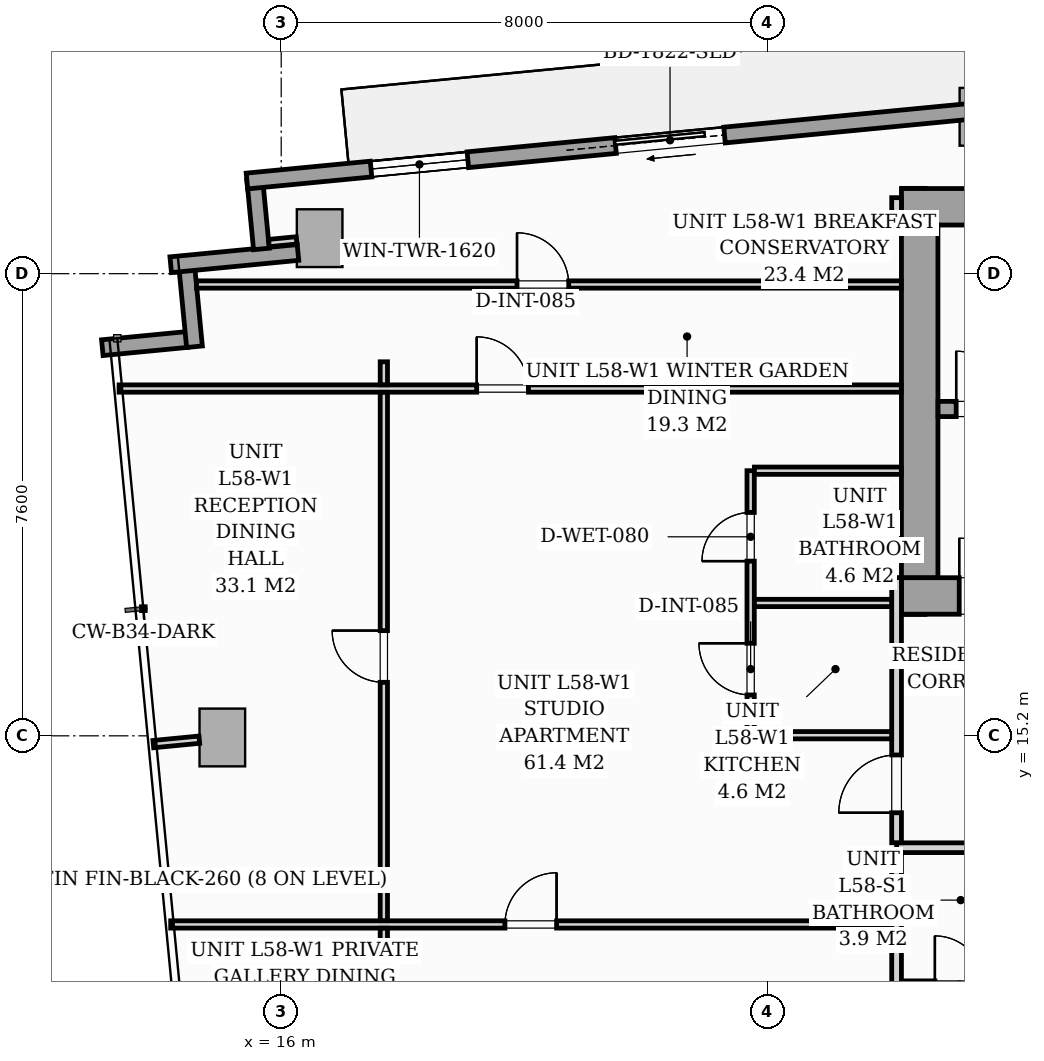
"""IFC4 building model, lengths in metres.
Left out: names, types, materials, properties, quantities, classifications, styles, units other than length and angle.
Written with IfcOpenShell. Run it as: python <this file> out.ifc"""

import sys

from ifc_helpers import new_model, si_unit, direction, frame, frame_2d, origin, origin_2d, place, context, subcontext, project, spatial, rectangle, i_section, extrude, source, transform, mapped, element, fill, save


model = new_model("IFC4")
c1 = context("Model", 3, precision=1e-05, world=origin(), true_north=direction((0.0, 1.0)))
c2 = subcontext(c1, "Body", "Model", "MODEL_VIEW")
j1 = project(units=[si_unit("LENGTHUNIT", "METRE"), si_unit("PLANEANGLEUNIT", "RADIAN")], contexts=[c1])
p1 = place(None, origin())
s1 = spatial("IfcSite", under=j1, at=p1, CompositionType="ELEMENT")
p2 = place(p1, origin())
s2 = spatial("IfcBuilding", under=s1, at=p2, CompositionType="ELEMENT")
p3 = place(p2, frame((0.0, 0.0, 201.8)))
s3 = spatial("IfcBuildingStorey", under=s2, at=p3, CompositionType="ELEMENT", Elevation=201.8)
m1 = source(origin(), c2, "Body", "SweptSolid", [
    extrude(i_section(OverallWidth=0.416, OverallDepth=0.446, WebThickness=0.039, FlangeThickness=0.063, FilletRadius=0.018, at=origin_2d()), origin(), (0.0, 0.0, 1.0), 3.196),
])
for number, where, z_axis, x_axis in (
    (1, (26.4, 17.4, 0.002), (0.0, 0.0, 1.0), (1.0, 0.0, 0.0)),
    (2, (26.4, 24.0, 0.002), (0.0, 0.0, 1.0), (1.0, 0.0, 0.0)),
):
    element("IfcColumn", number, at=place(p3, frame(where, z_axis=z_axis, x_axis=x_axis)), inside=s3, PredefinedType="PILASTER", context=c2, shape_type="MappedRepresentation", body=[
        mapped(m1, transform((0.0, 0.0, 0.0), scale=1.0)),
    ])
m2 = source(origin(), c2, "Body", "SweptSolid", [
    extrude(rectangle(XDim=0.75, YDim=0.95, at=origin_2d()), origin(), (0.0, 0.0, 1.0), 3.196),
])
for number, where, z_axis, x_axis in (
    (3, (16.632, 23.384, 0.002), (0.0, 0.0, 1.0), (0.995, 0.096, 0.0)),
    (4, (27.532, 25.38, 0.002), (0.0, 0.0, 1.0), (0.995, 0.096, 0.0)),
    (5, (15.032, 15.173, 0.002), (0.0, 0.0, 1.0), (0.995, 0.096, 0.0)),
):
    element("IfcColumn", number, at=place(p3, frame(where, z_axis=z_axis, x_axis=x_axis)), inside=s3, PredefinedType="COLUMN", context=c2, shape_type="MappedRepresentation", body=[
        mapped(m2, transform((0.0, 0.0, 0.0), scale=1.0)),
    ])
p4 = place(p3, frame((13.058, 21.583, 0.0), z_axis=(0.0, 0.0, 1.0), x_axis=(0.99540774648, 0.095725744959, 0.0)))
e6 = element("IfcWall", 6, at=p4, inside=s3, PredefinedType="STANDARD", context=c2, shape_type="SweptSolid", body=[
    extrude(rectangle(XDim=1.395, YDim=0.26, at=frame_2d((0.698, 0.0))), origin(), (0.0, 0.0, 1.0), 2.94),
])
p5 = place(p3, frame((14.574, 21.599, 0.0), z_axis=(0.0, 0.0, 1.0), x_axis=(-0.095742423056, 0.99540614245, 0.0)))
e7 = element("IfcWall", 7, at=p5, inside=s3, PredefinedType="STANDARD", context=c2, shape_type="SweptSolid", body=[
    extrude(rectangle(XDim=1.395, YDim=0.26, at=frame_2d((0.697, 0.0))), origin(), (0.0, 0.0, 1.0), 2.94),
])
p6 = place(p3, frame((14.183, 22.947, 0.0), z_axis=(0.0, 0.0, 1.0), x_axis=(0.995401580483, 0.095789840651, 0.0)))
e8 = element("IfcWall", 8, at=p6, inside=s3, PredefinedType="STANDARD", context=c2, shape_type="SweptSolid", body=[
    extrude(rectangle(XDim=2.103, YDim=0.26, at=frame_2d((1.051, 0.0))), origin(), (0.0, 0.0, 1.0), 2.94),
])
p7 = place(p3, frame((15.675, 23.207, 0.0), z_axis=(0.0, 0.0, 1.0), x_axis=(-0.095951054827, 0.995386053287, 0.0)))
e9 = element("IfcWall", 9, at=p7, inside=s3, PredefinedType="STANDARD", context=c2, shape_type="SweptSolid", body=[
    extrude(rectangle(XDim=1.15, YDim=0.26, at=frame_2d((0.575, 0.0))), origin(), (0.0, 0.0, 1.0), 2.94),
])
p8 = place(p3, frame((15.437, 24.324, 0.0), z_axis=(0.0, 0.0, 1.0), x_axis=(0.995395627913, 0.095851676732, 0.0)))
e10 = element("IfcWall", 10, at=p8, inside=s3, PredefinedType="STANDARD", context=c2, shape_type="SweptSolid", body=[
    extrude(rectangle(XDim=16.1, YDim=0.26, at=frame_2d((8.05, 0.0))), origin(), (0.0, 0.0, 1.0), 2.94),
])
p9 = place(p8, frame((6.09, 0.0, 0.0)))
e11 = element("IfcOpeningElement", 11, at=p9, cuts=e10, PredefinedType="OPENING", context=c2, shape_type="SweptSolid", body=[
    extrude(rectangle(XDim=1.8, YDim=2.06, at=frame_2d((0.9, 1.03))), frame((0.0, 0.14, 0.0), z_axis=(0.0, -1.0, 0.0), x_axis=(1.0, 0.0, 0.0)), (0.0, 0.0, 1.0), 0.28),
])
p10 = place(p8, frame((2.05, 0.0, 0.65)))
e12 = element("IfcOpeningElement", 12, at=p10, cuts=e10, PredefinedType="OPENING", context=c2, shape_type="SweptSolid", body=[
    extrude(rectangle(XDim=1.6, YDim=1.5, at=frame_2d((0.8, 0.75))), frame((0.0, 0.14, 0.0), z_axis=(0.0, -1.0, 0.0), x_axis=(1.0, 0.0, 0.0)), (0.0, 0.0, 1.0), 0.28),
])
p11 = place(p3, frame((26.2, 17.5, 0.0), z_axis=(0.0, 0.0, 1.0), x_axis=(1.0, 0.0, 0.0)))
e13 = element("IfcWall", 13, at=p11, inside=s3, PredefinedType="SHEAR", context=c2, shape_type="SweptSolid", body=[
    extrude(rectangle(XDim=19.6, YDim=0.6, at=frame_2d((9.8, 0.0))), origin(), (0.0, 0.0, 1.0), 3.2),
])
p12 = place(p11, frame((0.95, 0.0, 0.0)))
e14 = element("IfcOpeningElement", 14, at=p12, cuts=e13, PredefinedType="OPENING", context=c2, shape_type="SweptSolid", body=[
    extrude(rectangle(XDim=0.95, YDim=2.06, at=frame_2d((0.475, 1.03))), frame((0.0, 0.31, 0.0), z_axis=(0.0, -1.0, 0.0), x_axis=(1.0, 0.0, 0.0)), (0.0, 0.0, 1.0), 0.62),
])
p13 = place(p11, frame((9.38, 0.0, 0.0)))
e15 = element("IfcOpeningElement", 15, at=p13, cuts=e13, PredefinedType="OPENING", context=c2, shape_type="SweptSolid", body=[
    extrude(rectangle(XDim=0.85, YDim=2.0, at=frame_2d((0.425, 1.0))), frame((0.0, 0.31, 0.0), z_axis=(0.0, -1.0, 0.0), x_axis=(1.0, 0.0, 0.0)), (0.0, 0.0, 1.0), 0.62),
])
p14 = place(p11, frame((17.55, 0.0, 0.0)))
e16 = element("IfcOpeningElement", 16, at=p14, cuts=e13, PredefinedType="OPENING", context=c2, shape_type="SweptSolid", body=[
    extrude(rectangle(XDim=0.95, YDim=2.06, at=frame_2d((0.475, 1.03))), frame((0.0, 0.31, 0.0), z_axis=(0.0, -1.0, 0.0), x_axis=(1.0, 0.0, 0.0)), (0.0, 0.0, 1.0), 0.62),
])
p15 = place(p3, frame((26.2, 23.9, 0.0), z_axis=(0.0, 0.0, 1.0), x_axis=(1.0, 0.0, 0.0)))
e17 = element("IfcWall", 17, at=p15, inside=s3, PredefinedType="SHEAR", context=c2, shape_type="SweptSolid", body=[
    extrude(rectangle(XDim=19.6, YDim=0.6, at=frame_2d((9.8, 0.0))), origin(), (0.0, 0.0, 1.0), 3.2),
])
p16 = place(p3, frame((26.5, 17.802, 0.0), z_axis=(0.0, 0.0, 1.0), x_axis=(0.0, 1.0, 0.0)))
e18 = element("IfcWall", 18, at=p16, inside=s3, PredefinedType="SHEAR", context=c2, shape_type="SweptSolid", body=[
    extrude(rectangle(XDim=5.796, YDim=0.6, at=frame_2d((2.898, 0.0))), origin(), (0.0, 0.0, 1.0), 3.2),
])
p17 = place(p3, frame((26.802, 20.575, 0.0), z_axis=(0.0, 0.0, 1.0), x_axis=(1.0, 0.0, 0.0)))
e19 = element("IfcWall", 19, at=p17, inside=s3, PredefinedType="SOLIDWALL", context=c2, shape_type="SweptSolid", body=[
    extrude(rectangle(XDim=8.148, YDim=0.25, at=frame_2d((4.074, 0.0))), origin(), (0.0, 0.0, 1.0), 3.2),
])
p18 = place(p17, frame((0.298, 0.0, 0.0)))
e20 = element("IfcOpeningElement", 20, at=p18, cuts=e19, PredefinedType="OPENING", context=c2, shape_type="SweptSolid", body=[
    extrude(rectangle(XDim=0.95, YDim=2.06, at=frame_2d((0.475, 1.03))), frame((0.0, 0.135, 0.0), z_axis=(0.0, -1.0, 0.0), x_axis=(1.0, 0.0, 0.0)), (0.0, 0.0, 1.0), 0.27),
])
p19 = place(p3, frame((26.12, 13.36, 0.0), z_axis=(0.0, 0.0, 1.0), x_axis=(1.0, 0.0, 0.0)))
e21 = element("IfcWall", 21, at=p19, inside=s3, PredefinedType="PARTITIONING", context=c2, shape_type="SweptSolid", body=[
    extrude(rectangle(XDim=19.76, YDim=0.16, at=frame_2d((9.88, 0.0))), origin(), (0.0, 0.0, 1.0), 2.94),
])
p20 = place(p19, frame((5.221, 0.0, 0.0)))
e22 = element("IfcOpeningElement", 22, at=p20, cuts=e21, PredefinedType="OPENING", context=c2, shape_type="SweptSolid", body=[
    extrude(rectangle(XDim=0.95, YDim=2.06, at=frame_2d((0.475, 1.03))), frame((0.0, 0.09, 0.0), z_axis=(0.0, -1.0, 0.0), x_axis=(1.0, 0.0, 0.0)), (0.0, 0.0, 1.0), 0.18),
])
p21 = place(p19, frame((12.119, 0.0, 0.0)))
e23 = element("IfcOpeningElement", 23, at=p21, cuts=e21, PredefinedType="OPENING", context=c2, shape_type="SweptSolid", body=[
    extrude(rectangle(XDim=0.95, YDim=2.06, at=frame_2d((0.475, 1.03))), frame((0.0, 0.09, 0.0), z_axis=(0.0, -1.0, 0.0), x_axis=(1.0, 0.0, 0.0)), (0.0, 0.0, 1.0), 0.18),
])
p22 = place(p19, frame((14.492, 0.0, 0.0)))
e24 = element("IfcOpeningElement", 24, at=p22, cuts=e21, PredefinedType="OPENING", context=c2, shape_type="SweptSolid", body=[
    extrude(rectangle(XDim=0.95, YDim=2.06, at=frame_2d((0.475, 1.03))), frame((0.0, 0.09, 0.0), z_axis=(0.0, -1.0, 0.0), x_axis=(1.0, 0.0, 0.0)), (0.0, 0.0, 1.0), 0.18),
])
p23 = place(p3, frame((26.12, 7.261, 0.0), z_axis=(0.0, 0.0, 1.0), x_axis=(0.0, 1.0, 0.0)))
e25 = element("IfcWall", 25, at=p23, inside=s3, PredefinedType="PARTITIONING", context=c2, shape_type="SweptSolid", body=[
    extrude(rectangle(XDim=6.017, YDim=0.16, at=frame_2d((3.008, 0.0))), origin(), (0.0, 0.0, 1.0), 2.94),
])
p24 = place(p3, frame((26.12, 13.442, 0.0), z_axis=(0.0, 0.0, 1.0), x_axis=(0.0, 1.0, 0.0)))
e26 = element("IfcWall", 26, at=p24, inside=s3, PredefinedType="PARTITIONING", context=c2, shape_type="SweptSolid", body=[
    extrude(rectangle(XDim=4.36, YDim=0.16, at=frame_2d((2.18, 0.0))), origin(), (0.0, 0.0, 1.0), 2.94),
])
p25 = place(p24, frame((0.493, 0.0, 0.0)))
e27 = element("IfcOpeningElement", 27, at=p25, cuts=e26, PredefinedType="OPENING", context=c2, shape_type="SweptSolid", body=[
    extrude(rectangle(XDim=0.95, YDim=2.06, at=frame_2d((0.475, 1.03))), frame((0.0, 0.09, 0.0), z_axis=(0.0, -1.0, 0.0), x_axis=(1.0, 0.0, 0.0)), (0.0, 0.0, 1.0), 0.18),
])
p26 = place(p3, frame((26.12, 23.598, 0.0), z_axis=(0.0, 0.0, 1.0), x_axis=(0.0, 1.0, 0.0)))
e28 = element("IfcWall", 28, at=p26, inside=s3, PredefinedType="PARTITIONING", context=c2, shape_type="SweptSolid", body=[
    extrude(rectangle(XDim=0.452, YDim=0.16, at=frame_2d((0.226, 0.0))), origin(), (0.0, 0.0, 1.0), 2.94),
])
p27 = place(p3, frame((26.202, 11.11, 0.0), z_axis=(0.0, 0.0, 1.0), x_axis=(1.0, 0.0, 0.0)))
e29 = element("IfcWall", 29, at=p27, inside=s3, PredefinedType="PARTITIONING", context=c2, shape_type="SweptSolid", body=[
    extrude(rectangle(XDim=4.098, YDim=0.12, at=frame_2d((2.049, 0.0))), origin(), (0.0, 0.0, 1.0), 2.94),
])
p28 = place(p27, frame((0.548, 0.0, 0.0)))
e30 = element("IfcOpeningElement", 30, at=p28, cuts=e29, PredefinedType="OPENING", context=c2, shape_type="SweptSolid", body=[
    extrude(rectangle(XDim=0.8, YDim=2.02, at=frame_2d((0.4, 1.01))), frame((0.0, 0.07, 0.0), z_axis=(0.0, -1.0, 0.0), x_axis=(1.0, 0.0, 0.0)), (0.0, 0.0, 1.0), 0.14),
])
p29 = place(p27, frame((2.573, 0.0, 0.0)))
e31 = element("IfcOpeningElement", 31, at=p29, cuts=e29, PredefinedType="OPENING", context=c2, shape_type="SweptSolid", body=[
    extrude(rectangle(XDim=0.85, YDim=2.05, at=frame_2d((0.425, 1.025))), frame((0.0, 0.07, 0.0), z_axis=(0.0, -1.0, 0.0), x_axis=(1.0, 0.0, 0.0)), (0.0, 0.0, 1.0), 0.14),
])
p30 = place(p3, frame((23.72, 15.21, 0.0), z_axis=(0.0, 0.0, 1.0), x_axis=(0.0, 1.0, 0.0)))
e32 = element("IfcWall", 32, at=p30, inside=s3, PredefinedType="PARTITIONING", context=c2, shape_type="SweptSolid", body=[
    extrude(rectangle(XDim=4.35, YDim=0.12, at=frame_2d((2.175, 0.0))), origin(), (0.0, 0.0, 1.0), 2.94),
])
p31 = place(p30, frame((0.662, 0.0, 0.0)))
e33 = element("IfcOpeningElement", 33, at=p31, cuts=e32, PredefinedType="OPENING", context=c2, shape_type="SweptSolid", body=[
    extrude(rectangle(XDim=0.85, YDim=2.05, at=frame_2d((0.425, 1.025))), frame((0.0, 0.07, 0.0), z_axis=(0.0, -1.0, 0.0), x_axis=(1.0, 0.0, 0.0)), (0.0, 0.0, 1.0), 0.14),
])
p32 = place(p30, frame((2.863, 0.0, 0.0)))
e34 = element("IfcOpeningElement", 34, at=p32, cuts=e32, PredefinedType="OPENING", context=c2, shape_type="SweptSolid", body=[
    extrude(rectangle(XDim=0.8, YDim=2.02, at=frame_2d((0.4, 1.01))), frame((0.0, 0.07, 0.0), z_axis=(0.0, -1.0, 0.0), x_axis=(1.0, 0.0, 0.0)), (0.0, 0.0, 1.0), 0.14),
])
p33 = place(p3, frame((23.782, 17.385, 0.0), z_axis=(0.0, 0.0, 1.0), x_axis=(1.0, 0.0, 0.0)))
e35 = element("IfcWall", 35, at=p33, inside=s3, PredefinedType="PARTITIONING", context=c2, shape_type="SweptSolid", body=[
    extrude(rectangle(XDim=2.256, YDim=0.12, at=frame_2d((1.128, 0.0))), origin(), (0.0, 0.0, 1.0), 2.281),
])
p34 = place(p3, frame((23.782, 15.21, 0.0), z_axis=(0.0, 0.0, 1.0), x_axis=(1.0, 0.0, 0.0)))
e36 = element("IfcWall", 36, at=p34, inside=s3, PredefinedType="PARTITIONING", context=c2, shape_type="SweptSolid", body=[
    extrude(rectangle(XDim=2.256, YDim=0.12, at=frame_2d((1.128, 0.0))), origin(), (0.0, 0.0, 1.0), 2.94),
])
p35 = place(p3, frame((23.782, 19.56, 0.0), z_axis=(0.0, 0.0, 1.0), x_axis=(1.0, 0.0, 0.0)))
e37 = element("IfcWall", 37, at=p35, inside=s3, PredefinedType="PARTITIONING", context=c2, shape_type="SweptSolid", body=[
    extrude(rectangle(XDim=2.416, YDim=0.12, at=frame_2d((1.208, 0.0))), origin(), (0.0, 0.0, 1.0), 2.94),
])
p36 = place(p3, frame((14.608, 22.622, 0.0), z_axis=(0.0, 0.0, 1.0), x_axis=(1.0, 0.0, 0.0)))
e38 = element("IfcWall", 38, at=p36, inside=s3, PredefinedType="PARTITIONING", context=c2, shape_type="SweptSolid", body=[
    extrude(rectangle(XDim=11.59, YDim=0.12, at=frame_2d((5.795, 0.0))), origin(), (0.0, 0.0, 1.0), 2.94),
])
p37 = place(p36, frame((5.27, 0.0, 0.0)))
e39 = element("IfcOpeningElement", 39, at=p37, cuts=e38, PredefinedType="OPENING", context=c2, shape_type="SweptSolid", body=[
    extrude(rectangle(XDim=0.85, YDim=2.05, at=frame_2d((0.425, 1.025))), frame((0.0, 0.07, 0.0), z_axis=(0.0, -1.0, 0.0), x_axis=(1.0, 0.0, 0.0)), (0.0, 0.0, 1.0), 0.14),
])
p38 = place(p3, frame((14.183, 12.098, 0.0), z_axis=(0.0, 0.0, 1.0), x_axis=(1.0, 0.0, 0.0)))
e40 = element("IfcWall", 40, at=p38, inside=s3, PredefinedType="PARTITIONING", context=c2, shape_type="SweptSolid", body=[
    extrude(rectangle(XDim=11.855, YDim=0.12, at=frame_2d((5.928, 0.0))), origin(), (0.0, 0.0, 1.0), 2.94),
])
p39 = place(p38, frame((5.496, 0.0, 0.0)))
e41 = element("IfcOpeningElement", 41, at=p39, cuts=e40, PredefinedType="OPENING", context=c2, shape_type="SweptSolid", body=[
    extrude(rectangle(XDim=0.85, YDim=2.05, at=frame_2d((0.425, 1.025))), frame((0.0, 0.07, 0.0), z_axis=(0.0, -1.0, 0.0), x_axis=(1.0, 0.0, 0.0)), (0.0, 0.0, 1.0), 0.14),
])
p40 = place(p3, frame((13.334, 20.911, 0.0), z_axis=(0.0, 0.0, 1.0), x_axis=(1.0, 0.0, 0.0)))
e42 = element("IfcWall", 42, at=p40, inside=s3, PredefinedType="PARTITIONING", context=c2, shape_type="SweptSolid", body=[
    extrude(rectangle(XDim=12.864, YDim=0.12, at=frame_2d((6.432, 0.0))), origin(), (0.0, 0.0, 1.0), 2.94),
])
p41 = place(p40, frame((5.881, 0.0, 0.0)))
e43 = element("IfcOpeningElement", 43, at=p41, cuts=e42, PredefinedType="OPENING", context=c2, shape_type="SweptSolid", body=[
    extrude(rectangle(XDim=0.85, YDim=2.05, at=frame_2d((0.425, 1.025))), frame((0.0, 0.07, 0.0), z_axis=(0.0, -1.0, 0.0), x_axis=(1.0, 0.0, 0.0)), (0.0, 0.0, 1.0), 0.14),
])
p42 = place(p3, frame((17.688, 11.658, 0.0), z_axis=(0.0, 0.0, 1.0), x_axis=(0.0, 1.0, 0.0)))
e44 = element("IfcWall", 44, at=p42, inside=s3, PredefinedType="PARTITIONING", context=c2, shape_type="SweptSolid", body=[
    extrude(rectangle(XDim=0.378, YDim=0.12, at=frame_2d((0.189, 0.0))), origin(), (0.0, 0.0, 1.0), 2.94),
])
p43 = place(p3, frame((17.688, 12.16, 0.0), z_axis=(0.0, 0.0, 1.0), x_axis=(0.0, 1.0, 0.0)))
e45 = element("IfcWall", 45, at=p43, inside=s3, PredefinedType="PARTITIONING", context=c2, shape_type="SweptSolid", body=[
    extrude(rectangle(XDim=8.689, YDim=0.12, at=frame_2d((4.345, 0.0))), origin(), (0.0, 0.0, 1.0), 2.94),
])
p44 = place(p43, frame((3.92, 0.0, 0.0)))
e46 = element("IfcOpeningElement", 46, at=p44, cuts=e45, PredefinedType="OPENING", context=c2, shape_type="SweptSolid", body=[
    extrude(rectangle(XDim=0.85, YDim=2.05, at=frame_2d((0.425, 1.025))), frame((0.0, 0.07, 0.0), z_axis=(0.0, -1.0, 0.0), x_axis=(1.0, 0.0, 0.0)), (0.0, 0.0, 1.0), 0.14),
])
p45 = place(p3, frame((17.688, 20.973, 0.0), z_axis=(0.0, 0.0, 1.0), x_axis=(0.0, 1.0, 0.0)))
e47 = element("IfcWall", 47, at=p45, inside=s3, PredefinedType="PARTITIONING", context=c2, shape_type="SweptSolid", body=[
    extrude(rectangle(XDim=0.378, YDim=0.12, at=frame_2d((0.189, 0.0))), origin(), (0.0, 0.0, 1.0), 2.94),
])
p46 = place(p3, frame((16.254, 23.348, 0.0), z_axis=(0.0, 0.0, 1.0), x_axis=(-0.995389482415, -0.095915474751, 0.0)))
e48 = element("IfcWall", 48, at=p46, inside=s3, PredefinedType="PARTITIONING", context=c2, shape_type="SweptSolid", body=[
    extrude(rectangle(XDim=0.458, YDim=0.12, at=frame_2d((0.229, 0.0))), origin(), (0.0, 0.0, 1.0), 2.94),
])
p47 = place(p3, frame((14.654, 15.136, 0.0), z_axis=(0.0, 0.0, 1.0), x_axis=(-0.995408440582, -0.095718527039, 0.0)))
e49 = element("IfcWall", 49, at=p47, inside=s3, PredefinedType="PARTITIONING", context=c2, shape_type="SweptSolid", body=[
    extrude(rectangle(XDim=0.76, YDim=0.12, at=frame_2d((0.38, 0.0))), origin(), (0.0, 0.0, 1.0), 2.94),
])
m3 = source(origin(), c2, "Body", "SweptSolid", [
    extrude(rectangle(XDim=1.8, YDim=2.06, at=frame_2d((0.9, 1.03))), frame((0.0, 0.025, 0.0), z_axis=(0.0, -1.0, 0.0), x_axis=(1.0, 0.0, 0.0)), (0.0, 0.0, 1.0), 0.05),
])
p48 = place(p9, origin())
e50 = element("IfcDoor", 50, at=p48, inside=s3, OperationType="SLIDING_TO_LEFT", PredefinedType="DOOR", context=c2, shape_type="MappedRepresentation", body=[
    mapped(m3, transform((0.0, 0.0, 0.0), scale=1.0)),
])
fill(e11, e50)
m4 = source(origin(), c2, "Body", "SweptSolid", [
    extrude(rectangle(XDim=1.6, YDim=1.5, at=frame_2d((0.8, 0.75))), frame((0.0, 0.03, 0.0), z_axis=(0.0, -1.0, 0.0), x_axis=(1.0, 0.0, 0.0)), (0.0, 0.0, 1.0), 0.06),
])
p49 = place(p10, origin())
e51 = element("IfcWindow", 51, at=p49, inside=s3, PartitioningType="SINGLE_PANEL", PredefinedType="WINDOW", context=c2, shape_type="MappedRepresentation", body=[
    mapped(m4, transform((0.0, 0.0, 0.0), scale=1.0)),
])
fill(e12, e51)
m5 = source(origin(), c2, "Body", "SweptSolid", [
    extrude(rectangle(XDim=0.95, YDim=2.06, at=frame_2d((0.475, 1.03))), frame((0.0, 0.025, 0.0), z_axis=(0.0, -1.0, 0.0), x_axis=(1.0, 0.0, 0.0)), (0.0, 0.0, 1.0), 0.05),
])
p50 = place(p12, origin())
e52 = element("IfcDoor", 52, at=p50, inside=s3, OperationType="SINGLE_SWING_LEFT", PredefinedType="DOOR", context=c2, shape_type="MappedRepresentation", body=[
    mapped(m5, transform((0.0, 0.0, 0.0), scale=1.0)),
])
fill(e14, e52)
p51 = place(p18, origin())
e53 = element("IfcDoor", 53, at=p51, inside=s3, OperationType="SINGLE_SWING_LEFT", PredefinedType="DOOR", context=c2, shape_type="MappedRepresentation", body=[
    mapped(m5, transform((0.0, 0.0, 0.0), scale=1.0)),
])
fill(e20, e53)
m6 = source(origin(), c2, "Body", "SweptSolid", [
    extrude(rectangle(XDim=0.95, YDim=2.06, at=frame_2d((0.475, 1.03))), frame((0.0, 0.025, 0.0), z_axis=(0.0, -1.0, 0.0), x_axis=(1.0, 0.0, 0.0)), (0.0, 0.0, 1.0), 0.05),
])
p52 = place(p25, origin())
e54 = element("IfcDoor", 54, at=p52, inside=s3, OperationType="SINGLE_SWING_LEFT", PredefinedType="DOOR", context=c2, shape_type="MappedRepresentation", body=[
    mapped(m6, transform((0.0, 0.0, 0.0), scale=1.0)),
])
fill(e27, e54)
m7 = source(origin(), c2, "Body", "SweptSolid", [
    extrude(rectangle(XDim=0.85, YDim=2.05, at=frame_2d((0.425, 1.025))), frame((0.0, 0.025, 0.0), z_axis=(0.0, -1.0, 0.0), x_axis=(1.0, 0.0, 0.0)), (0.0, 0.0, 1.0), 0.05),
])
p53 = place(p31, origin())
e55 = element("IfcDoor", 55, at=p53, inside=s3, OperationType="SINGLE_SWING_RIGHT", PredefinedType="DOOR", context=c2, shape_type="MappedRepresentation", body=[
    mapped(m7, transform((0.0, 0.0, 0.0), scale=1.0)),
])
fill(e33, e55)
m8 = source(origin(), c2, "Body", "SweptSolid", [
    extrude(rectangle(XDim=0.8, YDim=2.02, at=frame_2d((0.4, 1.01))), frame((0.0, 0.025, 0.0), z_axis=(0.0, -1.0, 0.0), x_axis=(1.0, 0.0, 0.0)), (0.0, 0.0, 1.0), 0.05),
])
p54 = place(p32, origin())
e56 = element("IfcDoor", 56, at=p54, inside=s3, OperationType="SINGLE_SWING_LEFT", PredefinedType="DOOR", context=c2, shape_type="MappedRepresentation", body=[
    mapped(m8, transform((0.0, 0.0, 0.0), scale=1.0)),
])
fill(e34, e56)
p55 = place(p37, origin())
e57 = element("IfcDoor", 57, at=p55, inside=s3, OperationType="SINGLE_SWING_LEFT", PredefinedType="DOOR", context=c2, shape_type="MappedRepresentation", body=[
    mapped(m7, transform((0.0, 0.0, 0.0), scale=1.0)),
])
fill(e39, e57)
p56 = place(p39, origin())
e58 = element("IfcDoor", 58, at=p56, inside=s3, OperationType="SINGLE_SWING_RIGHT", PredefinedType="DOOR", context=c2, shape_type="MappedRepresentation", body=[
    mapped(m7, transform((0.0, 0.0, 0.0), scale=1.0)),
])
fill(e41, e58)
p57 = place(p41, origin())
e59 = element("IfcDoor", 59, at=p57, inside=s3, OperationType="SINGLE_SWING_LEFT", PredefinedType="DOOR", context=c2, shape_type="MappedRepresentation", body=[
    mapped(m7, transform((0.0, 0.0, 0.0), scale=1.0)),
])
fill(e43, e59)
p58 = place(p44, origin())
e60 = element("IfcDoor", 60, at=p58, inside=s3, OperationType="SINGLE_SWING_RIGHT", PredefinedType="DOOR", context=c2, shape_type="MappedRepresentation", body=[
    mapped(m7, transform((0.0, 0.0, 0.0), scale=1.0)),
])
fill(e46, e60)
save(model, sys.argv[1])
